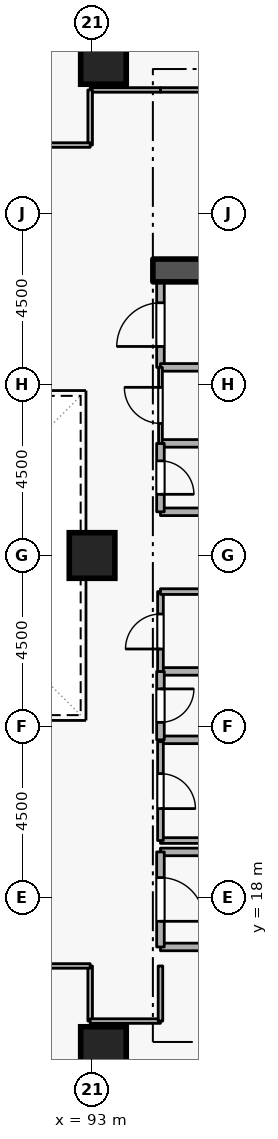
"""IFC4 building model, lengths in metres.
Left out: names, types, materials, properties, quantities, classifications, styles, units other than length and angle.
Written with IfcOpenShell. Run it as: python <this file> out.ifc"""

import sys

from ifc_helpers import new_model, si_unit, direction, frame, frame_2d, origin, origin_2d, place, context, subcontext, project, spatial, rectangle, extrude, element, fill, save


model = new_model("IFC4")
c1 = context("Model", 3, precision=1e-05, world=origin(), true_north=direction((0.0, 1.0)))
c2 = subcontext(c1, "Body", "Model", "MODEL_VIEW")
j1 = project(units=[si_unit("LENGTHUNIT", "METRE"), si_unit("PLANEANGLEUNIT", "RADIAN")], contexts=[c1])
p1 = place(None, origin())
s1 = spatial("IfcSite", under=j1, at=p1, CompositionType="ELEMENT")
p2 = place(p1, origin())
s2 = spatial("IfcBuilding", under=s1, at=p2, CompositionType="ELEMENT")
p3 = place(p2, frame((0.0, 0.0, 105.3)))
s3 = spatial("IfcBuildingStorey", under=s2, at=p3, CompositionType="ELEMENT", Elevation=105.3)
p4 = place(p3, frame((94.6, 34.5, 0.0), z_axis=(0.0, 0.0, 1.0), x_axis=(1.0, 0.0, 0.0)))
e1 = element("IfcWall", 1, at=p4, inside=s3, PredefinedType="SHEAR", context=c2, shape_type="SweptSolid", body=[
    extrude(rectangle(XDim=5.7, YDim=0.6, at=frame_2d((2.85, 0.0))), origin(), (0.0, 0.0, 1.0), 3.6),
])
for number, where, z_axis, x_axis in (
    (2, (93.3, 14.0, 0.0), (0.0, 0.0, 1.0), (1.0, 0.0, 0.0)),
    (3, (93.3, 40.0, 0.0), (0.0, 0.0, 1.0), (1.0, 0.0, 0.0)),
    (4, (93.0, 27.0, 0.0), (0.0, 0.0, 1.0), (1.0, 0.0, 0.0)),
):
    element("IfcColumn", number, at=place(p3, frame(where, z_axis=z_axis, x_axis=x_axis)), inside=s3, PredefinedType="COLUMN", context=c2, shape_type="SweptSolid", body=[
        extrude(rectangle(XDim=1.2, YDim=1.2, at=origin_2d()), origin(), (0.0, 0.0, 1.0), 3.6),
    ])
p5 = place(p3, frame((94.8, 16.7, 0.0), z_axis=(0.0, 0.0, 1.0), x_axis=(1.0, 0.0, 0.0)))
e5 = element("IfcWall", 5, at=p5, inside=s3, PredefinedType="STANDARD", context=c2, shape_type="SweptSolid", body=[
    extrude(rectangle(XDim=5.7, YDim=0.2, at=frame_2d((2.85, 0.0))), origin(), (0.0, 0.0, 1.0), 3.34),
])
p6 = place(p3, frame((97.1, 19.2, 0.0), z_axis=(0.0, 0.0, 1.0), x_axis=(-1.0, 0.0, 0.0)))
e6 = element("IfcWall", 6, at=p6, inside=s3, PredefinedType="STANDARD", context=c2, shape_type="SweptSolid", body=[
    extrude(rectangle(XDim=2.3, YDim=0.2, at=frame_2d((1.15, 0.0))), origin(), (0.0, 0.0, 1.0), 2.545),
])
p7 = place(p3, frame((94.8, 19.2, 0.0), z_axis=(0.0, 0.0, 1.0), x_axis=(0.0, -1.0, 0.0)))
e7 = element("IfcWall", 7, at=p7, inside=s3, PredefinedType="STANDARD", context=c2, shape_type="SweptSolid", body=[
    extrude(rectangle(XDim=2.5, YDim=0.2, at=frame_2d((1.25, 0.0))), origin(), (0.0, 0.0, 1.0), 3.34),
])
p8 = place(p7, frame((0.675, 0.0, 0.0)))
e8 = element("IfcOpeningElement", 8, at=p8, cuts=e7, PredefinedType="OPENING", context=c2, shape_type="SweptSolid", body=[
    extrude(rectangle(XDim=1.15, YDim=2.1, at=frame_2d((0.575, 1.05))), frame((0.0, 0.11, 0.0), z_axis=(0.0, -1.0, 0.0), x_axis=(1.0, 0.0, 0.0)), (0.0, 0.0, 1.0), 0.22),
])
for number, where, z_axis, x_axis in (
    (9, (94.8, 28.15, 0.0), (0.0, 0.0, 1.0), (1.0, 0.0, 0.0)),
    (10, (96.85, 29.95, 0.0), (0.0, 0.0, 1.0), (-1.0, 0.0, 0.0)),
):
    element("IfcWall", number, at=place(p3, frame(where, z_axis=z_axis, x_axis=x_axis)), inside=s3, PredefinedType="STANDARD", context=c2, shape_type="SweptSolid", body=[
        extrude(rectangle(XDim=2.05, YDim=0.2, at=frame_2d((1.025, 0.0))), origin(), (0.0, 0.0, 1.0), 3.34),
    ])
p9 = place(p3, frame((94.8, 29.95, 0.0), z_axis=(0.0, 0.0, 1.0), x_axis=(0.0, -1.0, 0.0)))
e11 = element("IfcWall", 11, at=p9, inside=s3, PredefinedType="STANDARD", context=c2, shape_type="SweptSolid", body=[
    extrude(rectangle(XDim=1.8, YDim=0.2, at=frame_2d((0.9, 0.0))), origin(), (0.0, 0.0, 1.0), 3.34),
])
p10 = place(p9, frame((0.46, 0.0, 0.0)))
e12 = element("IfcOpeningElement", 12, at=p10, cuts=e11, PredefinedType="OPENING", context=c2, shape_type="SweptSolid", body=[
    extrude(rectangle(XDim=0.88, YDim=2.04, at=frame_2d((0.44, 1.02))), frame((0.0, 0.11, 0.0), z_axis=(0.0, -1.0, 0.0), x_axis=(1.0, 0.0, 0.0)), (0.0, 0.0, 1.0), 0.22),
])
for number, where, z_axis, x_axis in (
    (13, (94.8, 22.15, 0.0), (0.0, 0.0, 1.0), (1.0, 0.0, 0.0)),
    (14, (96.85, 23.95, 0.0), (0.0, 0.0, 1.0), (-1.0, 0.0, 0.0)),
):
    element("IfcWall", number, at=place(p3, frame(where, z_axis=z_axis, x_axis=x_axis)), inside=s3, PredefinedType="STANDARD", context=c2, shape_type="SweptSolid", body=[
        extrude(rectangle(XDim=2.05, YDim=0.2, at=frame_2d((1.025, 0.0))), origin(), (0.0, 0.0, 1.0), 3.34),
    ])
p11 = place(p3, frame((94.8, 23.95, 0.0), z_axis=(0.0, 0.0, 1.0), x_axis=(0.0, -1.0, 0.0)))
e15 = element("IfcWall", 15, at=p11, inside=s3, PredefinedType="STANDARD", context=c2, shape_type="SweptSolid", body=[
    extrude(rectangle(XDim=1.8, YDim=0.2, at=frame_2d((0.9, 0.0))), origin(), (0.0, 0.0, 1.0), 3.34),
])
p12 = place(p11, frame((0.46, 0.0, 0.0)))
e16 = element("IfcOpeningElement", 16, at=p12, cuts=e15, PredefinedType="OPENING", context=c2, shape_type="SweptSolid", body=[
    extrude(rectangle(XDim=0.88, YDim=2.04, at=frame_2d((0.44, 1.02))), frame((0.0, 0.11, 0.0), z_axis=(0.0, -1.0, 0.0), x_axis=(1.0, 0.0, 0.0)), (0.0, 0.0, 1.0), 0.22),
])
p13 = place(p3, frame((94.8, 31.95, 0.0), z_axis=(0.0, 0.0, 1.0), x_axis=(0.0, 1.0, 0.0)))
e17 = element("IfcWall", 17, at=p13, inside=s3, PredefinedType="STANDARD", context=c2, shape_type="SweptSolid", body=[
    extrude(rectangle(XDim=2.25, YDim=0.2, at=frame_2d((1.125, 0.0))), origin(), (0.0, 0.0, 1.0), 3.34),
])
p14 = place(p13, frame((0.55, 0.0, 0.0)))
e18 = element("IfcOpeningElement", 18, at=p14, cuts=e17, PredefinedType="OPENING", context=c2, shape_type="SweptSolid", body=[
    extrude(rectangle(XDim=1.15, YDim=2.1, at=frame_2d((0.575, 1.05))), frame((0.0, 0.11, 0.0), z_axis=(0.0, -1.0, 0.0), x_axis=(1.0, 0.0, 0.0)), (0.0, 0.0, 1.0), 0.22),
])
p15 = place(p3, frame((96.85, 31.95, 0.0), z_axis=(0.0, 0.0, 1.0), x_axis=(-1.0, 0.0, 0.0)))
e19 = element("IfcWall", 19, at=p15, inside=s3, PredefinedType="STANDARD", context=c2, shape_type="SweptSolid", body=[
    extrude(rectangle(XDim=2.05, YDim=0.2, at=frame_2d((1.025, 0.0))), origin(), (0.0, 0.0, 1.0), 3.34),
])
p16 = place(p3, frame((94.8, 19.5, 0.0), z_axis=(0.0, 0.0, 1.0), x_axis=(1.0, 0.0, 0.0)))
e20 = element("IfcWall", 20, at=p16, inside=s3, PredefinedType="PARTITIONING", context=c2, shape_type="SweptSolid", body=[
    extrude(rectangle(XDim=2.05, YDim=0.15, at=frame_2d((1.025, 0.0))), origin(), (0.0, 0.0, 1.0), 2.545),
])
p17 = place(p3, frame((94.8, 22.1, 0.0), z_axis=(0.0, 0.0, 1.0), x_axis=(0.0, -1.0, 0.0)))
e21 = element("IfcWall", 21, at=p17, inside=s3, PredefinedType="PARTITIONING", context=c2, shape_type="SweptSolid", body=[
    extrude(rectangle(XDim=2.6, YDim=0.15, at=frame_2d((1.3, 0.0))), origin(), (0.0, 0.0, 1.0), 3.34),
])
p18 = place(p17, frame((0.84, 0.0, 0.0)))
e22 = element("IfcOpeningElement", 22, at=p18, cuts=e21, PredefinedType="OPENING", context=c2, shape_type="SweptSolid", body=[
    extrude(rectangle(XDim=0.92, YDim=2.08, at=frame_2d((0.46, 1.04))), frame((0.0, 0.085, 0.0), z_axis=(0.0, -1.0, 0.0), x_axis=(1.0, 0.0, 0.0)), (0.0, 0.0, 1.0), 0.17),
])
p19 = place(p3, frame((94.8, 23.95, 0.0), z_axis=(0.0, 0.0, 1.0), x_axis=(0.0, 1.0, 0.0)))
e23 = element("IfcWall", 23, at=p19, inside=s3, PredefinedType="PARTITIONING", context=c2, shape_type="SweptSolid", body=[
    extrude(rectangle(XDim=2.1, YDim=0.15, at=frame_2d((1.05, 0.0))), origin(), (0.0, 0.0, 1.0), 3.34),
])
p20 = place(p19, frame((0.59, 0.0, 0.0)))
e24 = element("IfcOpeningElement", 24, at=p20, cuts=e23, PredefinedType="OPENING", context=c2, shape_type="SweptSolid", body=[
    extrude(rectangle(XDim=0.92, YDim=2.08, at=frame_2d((0.46, 1.04))), frame((0.0, 0.085, 0.0), z_axis=(0.0, -1.0, 0.0), x_axis=(1.0, 0.0, 0.0)), (0.0, 0.0, 1.0), 0.17),
])
p21 = place(p3, frame((94.8, 26.05, 0.0), z_axis=(0.0, 0.0, 1.0), x_axis=(1.0, 0.0, 0.0)))
e25 = element("IfcWall", 25, at=p21, inside=s3, PredefinedType="PARTITIONING", context=c2, shape_type="SweptSolid", body=[
    extrude(rectangle(XDim=2.05, YDim=0.15, at=frame_2d((1.025, 0.0))), origin(), (0.0, 0.0, 1.0), 3.34),
])
p22 = place(p3, frame((94.8, 29.95, 0.0), z_axis=(0.0, 0.0, 1.0), x_axis=(0.0, 1.0, 0.0)))
e26 = element("IfcWall", 26, at=p22, inside=s3, PredefinedType="PARTITIONING", context=c2, shape_type="SweptSolid", body=[
    extrude(rectangle(XDim=2.0, YDim=0.1, at=frame_2d((1.0, 0.0))), origin(), (0.0, 0.0, 1.0), 3.34),
])
p23 = place(p22, frame((0.525, 0.0, 0.0)))
e27 = element("IfcOpeningElement", 27, at=p23, cuts=e26, PredefinedType="OPENING", context=c2, shape_type="SweptSolid", body=[
    extrude(rectangle(XDim=0.95, YDim=2.1, at=frame_2d((0.475, 1.05))), frame((0.0, 0.06, 0.0), z_axis=(0.0, -1.0, 0.0), x_axis=(1.0, 0.0, 0.0)), (0.0, 0.0, 1.0), 0.12),
])
p24 = place(p3, frame((92.95, 16.2, 0.0), z_axis=(0.0, 0.0, 1.0), x_axis=(0.0, -1.0, 0.0)))
e28 = element("IfcWall", 28, at=p24, inside=s3, PredefinedType="PARTITIONING", context=c2, shape_type="SweptSolid", body=[
    extrude(rectangle(XDim=1.45, YDim=0.12, at=frame_2d((0.725, 0.0))), origin(), (0.0, 0.0, 1.0), 3.34),
])
p25 = place(p3, frame((92.95, 14.75, 0.0), z_axis=(0.0, 0.0, 1.0), x_axis=(1.0, 0.0, 0.0)))
e29 = element("IfcWall", 29, at=p25, inside=s3, PredefinedType="PARTITIONING", context=c2, shape_type="SweptSolid", body=[
    extrude(rectangle(XDim=1.85, YDim=0.12, at=frame_2d((0.925, 0.0))), origin(), (0.0, 0.0, 1.0), 3.34),
])
p26 = place(p3, frame((94.8, 14.75, 0.0), z_axis=(0.0, 0.0, 1.0), x_axis=(0.0, 1.0, 0.0)))
e30 = element("IfcWall", 30, at=p26, inside=s3, PredefinedType="PARTITIONING", context=c2, shape_type="SweptSolid", body=[
    extrude(rectangle(XDim=1.45, YDim=0.12, at=frame_2d((0.725, 0.0))), origin(), (0.0, 0.0, 1.0), 3.34),
])
p27 = place(p3, frame((88.5, 16.2, 0.0), z_axis=(0.0, 0.0, 1.0), x_axis=(1.0, 0.0, 0.0)))
e31 = element("IfcWall", 31, at=p27, inside=s3, PredefinedType="PARTITIONING", context=c2, shape_type="SweptSolid", body=[
    extrude(rectangle(XDim=4.45, YDim=0.12, at=frame_2d((2.225, 0.0))), origin(), (0.0, 0.0, 1.0), 3.34),
])
p28 = place(p27, frame((1.7, 0.0, 0.0)))
e32 = element("IfcOpeningElement", 32, at=p28, cuts=e31, PredefinedType="OPENING", context=c2, shape_type="SweptSolid", body=[
    extrude(rectangle(XDim=1.05, YDim=2.1, at=frame_2d((0.525, 1.05))), frame((0.0, 0.07, 0.0), z_axis=(0.0, -1.0, 0.0), x_axis=(1.0, 0.0, 0.0)), (0.0, 0.0, 1.0), 0.14),
])
p29 = place(p3, frame((97.95, 39.25, 0.0), z_axis=(0.0, 0.0, 1.0), x_axis=(-1.0, 0.0, 0.0)))
e33 = element("IfcWall", 33, at=p29, inside=s3, PredefinedType="PARTITIONING", context=c2, shape_type="SweptSolid", body=[
    extrude(rectangle(XDim=3.15, YDim=0.12, at=frame_2d((1.575, 0.0))), origin(), (0.0, 0.0, 1.0), 3.34),
])
p30 = place(p3, frame((94.8, 39.25, 0.0), z_axis=(0.0, 0.0, 1.0), x_axis=(-1.0, 0.0, 0.0)))
e34 = element("IfcWall", 34, at=p30, inside=s3, PredefinedType="PARTITIONING", context=c2, shape_type="SweptSolid", body=[
    extrude(rectangle(XDim=1.85, YDim=0.12, at=frame_2d((0.925, 0.0))), origin(), (0.0, 0.0, 1.0), 3.34),
])
p31 = place(p3, frame((92.95, 39.25, 0.0), z_axis=(0.0, 0.0, 1.0), x_axis=(0.0, -1.0, 0.0)))
e35 = element("IfcWall", 35, at=p31, inside=s3, PredefinedType="PARTITIONING", context=c2, shape_type="SweptSolid", body=[
    extrude(rectangle(XDim=1.45, YDim=0.12, at=frame_2d((0.725, 0.0))), origin(), (0.0, 0.0, 1.0), 3.34),
])
p32 = place(p3, frame((92.95, 37.8, 0.0), z_axis=(0.0, 0.0, 1.0), x_axis=(-1.0, 0.0, 0.0)))
e36 = element("IfcWall", 36, at=p32, inside=s3, PredefinedType="PARTITIONING", context=c2, shape_type="SweptSolid", body=[
    extrude(rectangle(XDim=4.45, YDim=0.12, at=frame_2d((2.225, 0.0))), origin(), (0.0, 0.0, 1.0), 3.34),
])
p33 = place(p32, frame((1.7, 0.0, 0.0)))
e37 = element("IfcOpeningElement", 37, at=p33, cuts=e36, PredefinedType="OPENING", context=c2, shape_type="SweptSolid", body=[
    extrude(rectangle(XDim=1.05, YDim=2.1, at=frame_2d((0.525, 1.05))), frame((0.0, 0.07, 0.0), z_axis=(0.0, -1.0, 0.0), x_axis=(1.0, 0.0, 0.0)), (0.0, 0.0, 1.0), 0.14),
])
p34 = place(p8, origin())
e38 = element("IfcDoor", 38, at=p34, inside=s3, OperationType="SINGLE_SWING_RIGHT", PredefinedType="DOOR", context=c2, shape_type="SweptSolid", body=[
    extrude(rectangle(XDim=1.15, YDim=2.1, at=frame_2d((0.575, 1.05))), frame((0.0, 0.025, 0.0), z_axis=(0.0, -1.0, 0.0), x_axis=(1.0, 0.0, 0.0)), (0.0, 0.0, 1.0), 0.05),
])
fill(e8, e38)
p35 = place(p10, origin())
e39 = element("IfcDoor", 39, at=p35, inside=s3, OperationType="SINGLE_SWING_RIGHT", PredefinedType="DOOR", context=c2, shape_type="SweptSolid", body=[
    extrude(rectangle(XDim=0.88, YDim=2.04, at=frame_2d((0.44, 1.02))), frame((0.0, 0.025, 0.0), z_axis=(0.0, -1.0, 0.0), x_axis=(1.0, 0.0, 0.0)), (0.0, 0.0, 1.0), 0.05),
])
fill(e12, e39)
p36 = place(p12, origin())
e40 = element("IfcDoor", 40, at=p36, inside=s3, OperationType="SINGLE_SWING_LEFT", PredefinedType="DOOR", context=c2, shape_type="SweptSolid", body=[
    extrude(rectangle(XDim=0.88, YDim=2.04, at=frame_2d((0.44, 1.02))), frame((0.0, 0.025, 0.0), z_axis=(0.0, -1.0, 0.0), x_axis=(1.0, 0.0, 0.0)), (0.0, 0.0, 1.0), 0.05),
])
fill(e16, e40)
p37 = place(p18, origin())
e41 = element("IfcDoor", 41, at=p37, inside=s3, OperationType="SINGLE_SWING_RIGHT", PredefinedType="DOOR", context=c2, shape_type="SweptSolid", body=[
    extrude(rectangle(XDim=0.92, YDim=2.08, at=frame_2d((0.46, 1.04))), frame((0.0, 0.025, 0.0), z_axis=(0.0, -1.0, 0.0), x_axis=(1.0, 0.0, 0.0)), (0.0, 0.0, 1.0), 0.05),
])
fill(e22, e41)
p38 = place(p20, origin())
e42 = element("IfcDoor", 42, at=p38, inside=s3, OperationType="SINGLE_SWING_LEFT", PredefinedType="DOOR", context=c2, shape_type="SweptSolid", body=[
    extrude(rectangle(XDim=0.92, YDim=2.08, at=frame_2d((0.46, 1.04))), frame((0.0, 0.025, 0.0), z_axis=(0.0, -1.0, 0.0), x_axis=(1.0, 0.0, 0.0)), (0.0, 0.0, 1.0), 0.05),
])
fill(e24, e42)
p39 = place(p23, origin())
e43 = element("IfcDoor", 43, at=p39, inside=s3, OperationType="SINGLE_SWING_RIGHT", PredefinedType="DOOR", context=c2, shape_type="SweptSolid", body=[
    extrude(rectangle(XDim=0.95, YDim=2.1, at=frame_2d((0.475, 1.05))), frame((0.0, 0.025, 0.0), z_axis=(0.0, -1.0, 0.0), x_axis=(1.0, 0.0, 0.0)), (0.0, 0.0, 1.0), 0.05),
])
fill(e27, e43)
p40 = place(p14, origin())
e44 = element("IfcDoor", 44, at=p40, inside=s3, OperationType="SINGLE_SWING_LEFT", PredefinedType="DOOR", context=c2, shape_type="SweptSolid", body=[
    extrude(rectangle(XDim=1.15, YDim=2.1, at=frame_2d((0.575, 1.05))), frame((0.0, 0.025, 0.0), z_axis=(0.0, -1.0, 0.0), x_axis=(1.0, 0.0, 0.0)), (0.0, 0.0, 1.0), 0.05),
])
fill(e18, e44)
save(model, sys.argv[1])
